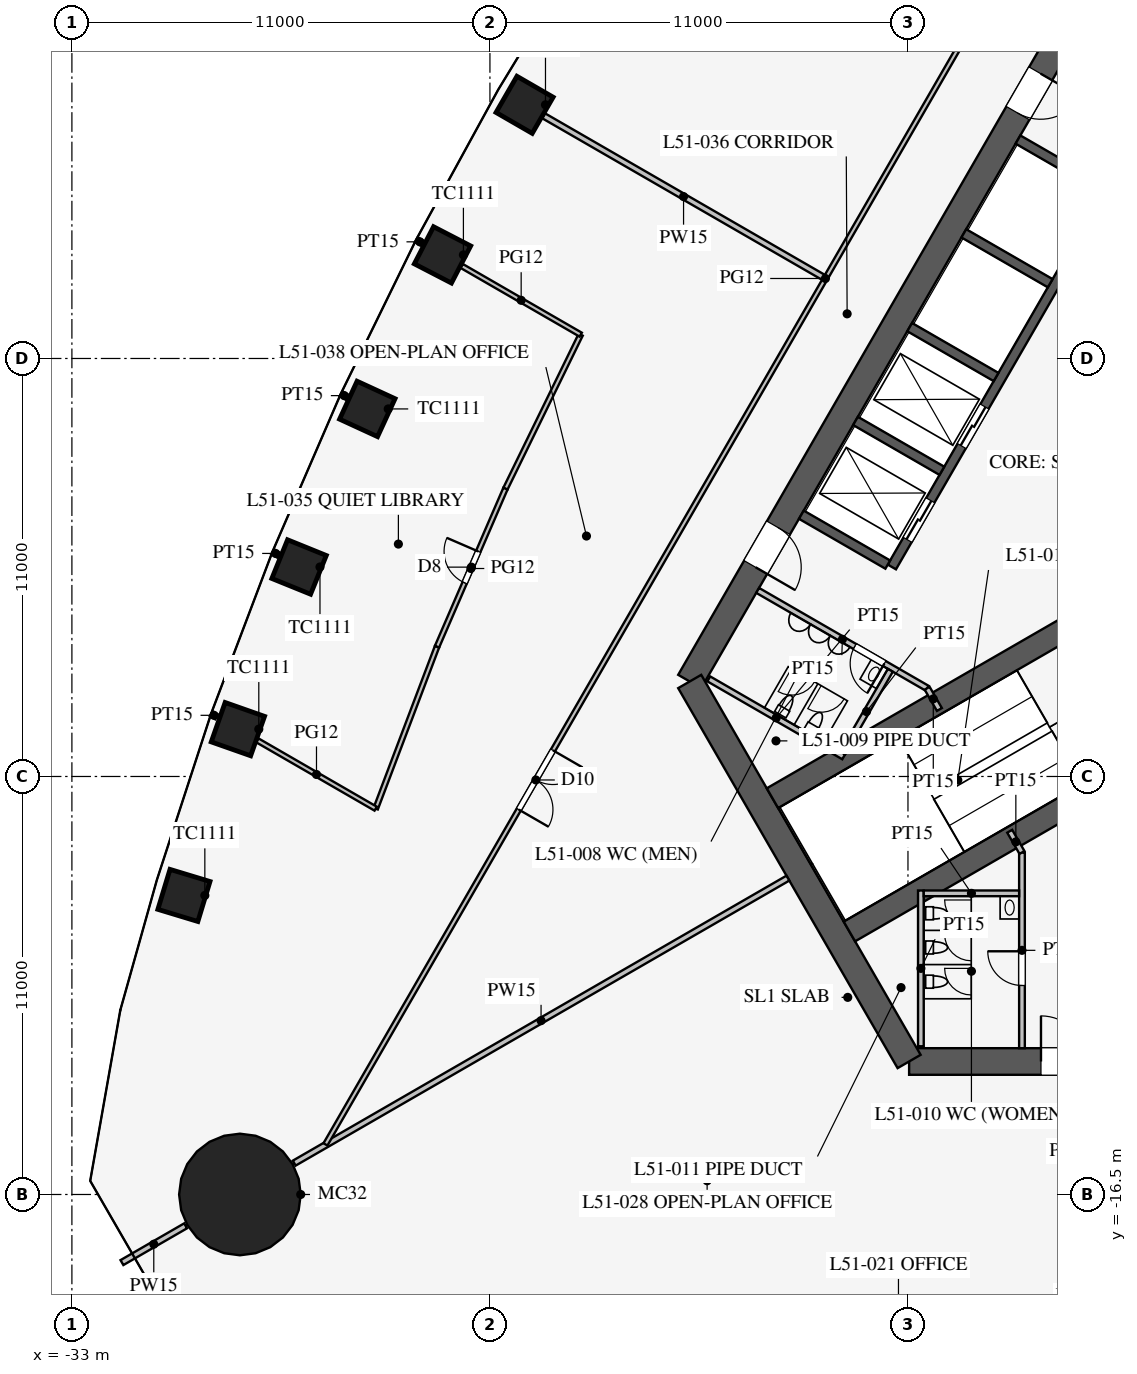
"""IFC4 building model, lengths in metres.
Left out: names, types, materials, properties, quantities, classifications, styles, units other than length and angle.
Written with IfcOpenShell. Run it as: python <this file> out.ifc"""

import sys

from ifc_helpers import new_model, si_unit, direction, frame, frame_2d, origin, origin_2d, place, context, subcontext, project, spatial, rectangle, circle, extrude, element, fill, save


model = new_model("IFC4")
c1 = context("Model", 3, precision=1e-05, world=origin(), true_north=direction((0.0, 1.0)))
c2 = subcontext(c1, "Body", "Model", "MODEL_VIEW")
j1 = project(units=[si_unit("LENGTHUNIT", "METRE"), si_unit("PLANEANGLEUNIT", "RADIAN")], contexts=[c1])
p1 = place(None, origin())
s1 = spatial("IfcSite", under=j1, at=p1, CompositionType="ELEMENT")
p2 = place(p1, origin())
s2 = spatial("IfcBuilding", under=s1, at=p2, CompositionType="ELEMENT")
p3 = place(p2, frame((0.0, 0.0, 223.3)))
s3 = spatial("IfcBuildingStorey", under=s2, at=p3, CompositionType="ELEMENT", Elevation=223.3)
for number, where, z_axis, x_axis in (
    (1, (-21.088, 12.175, 0.0), (0.0, 0.0, 1.0), (-0.5, -0.866, 0.0)),
    (2, (-23.248, 8.226, 0.0), (0.0, 0.0, 1.0), (-0.46, -0.888, 0.0)),
    (3, (-25.227, 4.172, 0.0), (0.0, 0.0, 1.0), (-0.418, -0.908, 0.0)),
    (4, (-27.022, 0.013, 0.0), (0.0, 0.0, 1.0), (-0.376, -0.927, 0.0)),
    (5, (-28.632, -4.254, 0.0), (0.0, 0.0, 1.0), (-0.332, -0.943, 0.0)),
    (6, (-30.052, -8.63, 0.0), (0.0, 0.0, 1.0), (-0.29, -0.957, 0.0)),
):
    element("IfcColumn", number, at=place(p3, frame(where, z_axis=z_axis, x_axis=x_axis)), inside=s3, PredefinedType="COLUMN", context=c2, shape_type="SweptSolid", body=[
        extrude(rectangle(XDim=1.1, YDim=1.1, at=origin_2d()), origin(), (0.0, 0.0, 1.0), 4.2),
    ])
p4 = place(p3, frame((-28.579, -16.5, 0.0), z_axis=(0.0, 0.0, 1.0), x_axis=(1.0, 0.0, 0.0)))
e7 = element("IfcColumn", 7, at=p4, inside=s3, PredefinedType="COLUMN", context=c2, shape_type="SweptSolid", body=[
    extrude(circle(Radius=1.6, at=origin_2d()), origin(), (0.0, 0.0, 1.0), 4.2),
])
p5 = place(p3, frame((-10.97, -13.0, 0.0), z_axis=(0.0, 0.0, 1.0), x_axis=(1.0, 0.0, 0.0)))
e8 = element("IfcWall", 8, at=p5, inside=s3, PredefinedType="SHEAR", context=c2, shape_type="SweptSolid", body=[
    extrude(rectangle(XDim=21.939, YDim=0.7, at=frame_2d((10.97, 0.0))), origin(), (0.0, 0.0, 1.0), 4.2),
])
p6 = place(p5, frame((17.27, 0.0, 0.0)))
e9 = element("IfcOpeningElement", 9, at=p6, cuts=e8, PredefinedType="OPENING", context=c2, shape_type="SweptSolid", body=[
    extrude(rectangle(XDim=1.2, YDim=2.1, at=frame_2d((0.6, 1.05))), frame((0.0, 0.36, 0.0), z_axis=(0.0, -1.0, 0.0), x_axis=(1.0, 0.0, 0.0)), (0.0, 0.0, 1.0), 0.72),
])
p7 = place(p5, frame((3.47, 0.0, 0.0)))
e10 = element("IfcOpeningElement", 10, at=p7, cuts=e8, PredefinedType="OPENING", context=c2, shape_type="SweptSolid", body=[
    extrude(rectangle(XDim=1.2, YDim=2.1, at=frame_2d((0.6, 1.05))), frame((0.0, 0.36, 0.0), z_axis=(0.0, -1.0, 0.0), x_axis=(1.0, 0.0, 0.0)), (0.0, 0.0, 1.0), 0.72),
])
p8 = place(p3, frame((-5.773, 16.0, 0.0), z_axis=(0.0, 0.0, 1.0), x_axis=(-0.500002442456, -0.866023993627, 0.0)))
e11 = element("IfcWall", 11, at=p8, inside=s3, PredefinedType="SHEAR", context=c2, shape_type="SweptSolid", body=[
    extrude(rectangle(XDim=21.939, YDim=0.7, at=frame_2d((10.97, 0.0))), origin(), (0.0, 0.0, 1.0), 4.2),
])
p9 = place(p8, frame((17.27, 0.0, 0.0)))
e12 = element("IfcOpeningElement", 12, at=p9, cuts=e11, PredefinedType="OPENING", context=c2, shape_type="SweptSolid", body=[
    extrude(rectangle(XDim=1.2, YDim=2.1, at=frame_2d((0.6, 1.05))), frame((0.0, 0.36, 0.0), z_axis=(0.0, -1.0, 0.0), x_axis=(1.0, 0.0, 0.0)), (0.0, 0.0, 1.0), 0.72),
])
p10 = place(p8, frame((3.47, 0.0, 0.0)))
e13 = element("IfcOpeningElement", 13, at=p10, cuts=e11, PredefinedType="OPENING", context=c2, shape_type="SweptSolid", body=[
    extrude(rectangle(XDim=1.2, YDim=2.1, at=frame_2d((0.6, 1.05))), frame((0.0, 0.36, 0.0), z_axis=(0.0, -1.0, 0.0), x_axis=(1.0, 0.0, 0.0)), (0.0, 0.0, 1.0), 0.72),
])
p11 = place(p3, frame((-16.743, -3.0, 0.0), z_axis=(0.0, 0.0, 1.0), x_axis=(0.499995765644, -0.866027848477, 0.0)))
e14 = element("IfcWall", 14, at=p11, inside=s3, PredefinedType="SHEAR", context=c2, shape_type="SweptSolid", body=[
    extrude(rectangle(XDim=11.547, YDim=0.7, at=frame_2d((5.773, 0.0))), origin(), (0.0, 0.0, 1.0), 4.2),
])
p12 = place(p3, frame((-5.724, 9.886, 0.0), z_axis=(0.0, 0.0, 1.0), x_axis=(-0.500001763848, -0.866024385424, 0.0)))
e15 = element("IfcWall", 15, at=p12, inside=s3, PredefinedType="SHEAR", context=c2, shape_type="SweptSolid", body=[
    extrude(rectangle(XDim=11.4, YDim=0.25, at=frame_2d((5.7, 0.0))), origin(), (0.0, 0.0, 1.0), 4.2),
])
p13 = place(p12, frame((6.525, 0.0, 0.0)))
e16 = element("IfcOpeningElement", 16, at=p13, cuts=e15, PredefinedType="OPENING", context=c2, shape_type="SweptSolid", body=[
    extrude(rectangle(XDim=1.2, YDim=2.2, at=frame_2d((0.6, 1.1))), frame((0.0, 0.135, 0.0), z_axis=(0.0, -1.0, 0.0), x_axis=(1.0, 0.0, 0.0)), (0.0, 0.0, 1.0), 0.27),
])
p14 = place(p12, frame((9.375, 0.0, 0.0)))
e17 = element("IfcOpeningElement", 17, at=p14, cuts=e15, PredefinedType="OPENING", context=c2, shape_type="SweptSolid", body=[
    extrude(rectangle(XDim=1.2, YDim=2.2, at=frame_2d((0.6, 1.1))), frame((0.0, 0.135, 0.0), z_axis=(0.0, -1.0, 0.0), x_axis=(1.0, 0.0, 0.0)), (0.0, 0.0, 1.0), 0.27),
])
for number, where, z_axis, x_axis in (
    (18, (-5.832, 9.949, 0.0), (0.0, 0.0, 1.0), (-0.866, 0.5, 0.0)),
    (19, (-7.257, 7.481, 0.0), (0.0, 0.0, 1.0), (-0.866, 0.5, 0.0)),
    (20, (-8.682, 5.012, 0.0), (0.0, 0.0, 1.0), (-0.866, 0.5, 0.0)),
    (21, (-10.107, 2.544, 0.0), (0.0, 0.0, 1.0), (-0.866, 0.5, 0.0)),
    (22, (-11.532, 0.076, 0.0), (0.0, 0.0, 1.0), (-0.866, 0.5, 0.0)),
):
    element("IfcWall", number, at=place(p3, frame(where, z_axis=z_axis, x_axis=x_axis)), inside=s3, PredefinedType="SHEAR", context=c2, shape_type="SweptSolid", body=[
        extrude(rectangle(XDim=2.625, YDim=0.25, at=frame_2d((1.312, 0.0))), origin(), (0.0, 0.0, 1.0), 4.2),
    ])
for number, where, z_axis, x_axis in (
    (23, (-6.663, -1.509, 0.0), (0.0, 0.0, 1.0), (-0.866, -0.5, 0.0)),
    (24, (-4.638, -5.016, 0.0), (0.0, 0.0, 1.0), (-0.866, -0.5, 0.0)),
):
    element("IfcWall", number, at=place(p3, frame(where, z_axis=z_axis, x_axis=x_axis)), inside=s3, PredefinedType="SHEAR", context=c2, shape_type="SweptSolid", body=[
        extrude(rectangle(XDim=9.125, YDim=0.6, at=frame_2d((4.562, 0.0))), origin(), (0.0, 0.0, 1.0), 4.2),
    ])
p15 = place(p3, frame((-8.0, -7.5, 0.0), z_axis=(0.0, 0.0, 1.0), x_axis=(0.0, -1.0, 0.0)))
e25 = element("IfcWall", 25, at=p15, inside=s3, PredefinedType="PARTITIONING", context=c2, shape_type="SweptSolid", body=[
    extrude(rectangle(XDim=5.15, YDim=0.15, at=frame_2d((2.575, 0.0))), origin(), (0.0, 0.0, 1.0), 4.0),
])
p16 = place(p15, frame((2.6, 0.0, 0.0)))
e26 = element("IfcOpeningElement", 26, at=p16, cuts=e25, PredefinedType="OPENING", context=c2, shape_type="SweptSolid", body=[
    extrude(rectangle(XDim=0.9, YDim=2.1, at=frame_2d((0.45, 1.05))), frame((0.0, 0.085, 0.0), z_axis=(0.0, -1.0, 0.0), x_axis=(1.0, 0.0, 0.0)), (0.0, 0.0, 1.0), 0.17),
])
p17 = place(p3, frame((-10.495, -3.178, 0.0), z_axis=(0.0, 0.0, 1.0), x_axis=(-0.866037967349, 0.499978238636, 0.0)))
e27 = element("IfcWall", 27, at=p17, inside=s3, PredefinedType="PARTITIONING", context=c2, shape_type="SweptSolid", body=[
    extrude(rectangle(XDim=5.15, YDim=0.15, at=frame_2d((2.575, 0.0))), origin(), (0.0, 0.0, 1.0), 4.0),
])
p18 = place(p17, frame((1.3, 0.0, 0.0)))
e28 = element("IfcOpeningElement", 28, at=p18, cuts=e27, PredefinedType="OPENING", context=c2, shape_type="SweptSolid", body=[
    extrude(rectangle(XDim=0.9, YDim=2.1, at=frame_2d((0.45, 1.05))), frame((0.0, 0.085, 0.0), z_axis=(0.0, -1.0, 0.0), x_axis=(1.0, 0.0, 0.0)), (0.0, 0.0, 1.0), 0.17),
])
for number, where, z_axis, x_axis in (
    (29, (-10.495, -3.178, 0.0), (0.0, 0.0, 1.0), (0.5, -0.866, 0.0)),
    (30, (-8.0, -7.5, 0.0), (0.0, 0.0, 1.0), (-0.5, 0.866, 0.0)),
):
    element("IfcWall", number, at=place(p3, frame(where, z_axis=z_axis, x_axis=x_axis)), inside=s3, PredefinedType="PARTITIONING", context=c2, shape_type="SweptSolid", body=[
        extrude(rectangle(XDim=0.645, YDim=0.15, at=frame_2d((0.323, 0.0))), origin(), (0.0, 0.0, 1.0), 4.0),
    ])
p19 = place(p3, frame((-12.691, -4.982, 0.0), z_axis=(0.0, 0.0, 1.0), x_axis=(-0.8660249478, 0.500000789788, 0.0)))
e31 = element("IfcWall", 31, at=p19, inside=s3, PredefinedType="PARTITIONING", context=c2, shape_type="SweptSolid", body=[
    extrude(rectangle(XDim=4.1, YDim=0.15, at=frame_2d((2.05, 0.0))), origin(), (0.0, 0.0, 1.0), 4.0),
])
p20 = place(p3, frame((-11.464, -2.706, 0.0), z_axis=(0.0, 0.0, 1.0), x_axis=(-0.50001992892, -0.866013897511, 0.0)))
e32 = element("IfcWall", 32, at=p20, inside=s3, PredefinedType="PARTITIONING", context=c2, shape_type="SweptSolid", body=[
    extrude(rectangle(XDim=2.51, YDim=0.15, at=frame_2d((1.255, 0.0))), origin(), (0.0, 0.0, 1.0), 4.0),
])
p21 = place(p3, frame((-10.66, -8.5, 0.0), z_axis=(0.0, 0.0, 1.0), x_axis=(0.0, -1.0, 0.0)))
e33 = element("IfcWall", 33, at=p21, inside=s3, PredefinedType="PARTITIONING", context=c2, shape_type="SweptSolid", body=[
    extrude(rectangle(XDim=4.1, YDim=0.15, at=frame_2d((2.05, 0.0))), origin(), (0.0, 0.0, 1.0), 4.0),
])
p22 = place(p3, frame((-8.075, -8.575, 0.0), z_axis=(0.0, 0.0, 1.0), x_axis=(-1.0, 0.0, 0.0)))
e34 = element("IfcWall", 34, at=p22, inside=s3, PredefinedType="PARTITIONING", context=c2, shape_type="SweptSolid", body=[
    extrude(rectangle(XDim=2.51, YDim=0.15, at=frame_2d((1.255, 0.0))), origin(), (0.0, 0.0, 1.0), 4.0),
])
p23 = place(p3, frame((-14.159, -8.175, 0.0), z_axis=(0.0, 0.0, 1.0), x_axis=(-0.866027028085, -0.499997186618, 0.0)))
e35 = element("IfcWall", 35, at=p23, inside=s3, PredefinedType="PARTITIONING", context=c2, shape_type="SweptSolid", body=[
    extrude(rectangle(XDim=15.0, YDim=0.15, at=frame_2d((7.5, 0.0))), origin(), (0.0, 0.0, 1.0), 2.4),
])
p24 = place(p3, frame((-30.008, -17.325, 0.0), z_axis=(0.0, 0.0, 1.0), x_axis=(-0.866013246922, -0.500021055713, 0.0)))
e36 = element("IfcWall", 36, at=p24, inside=s3, PredefinedType="PARTITIONING", context=c2, shape_type="SweptSolid", body=[
    extrude(rectangle(XDim=1.935, YDim=0.15, at=frame_2d((0.967, 0.0))), origin(), (0.0, 0.0, 1.0), 2.4),
])
p25 = place(p3, frame((-13.224, 7.635, 0.0), z_axis=(0.0, 0.0, 1.0), x_axis=(-0.86603062717, 0.499990952723, 0.0)))
e37 = element("IfcWall", 37, at=p25, inside=s3, PredefinedType="PARTITIONING", context=c2, shape_type="SweptSolid", body=[
    extrude(rectangle(XDim=8.501, YDim=0.15, at=frame_2d((4.25, 0.0))), origin(), (0.0, 0.0, 1.0), 3.3),
])
p26 = place(p3, frame((-0.016, 30.392, 0.0), z_axis=(0.0, 0.0, 1.0), x_axis=(-0.500000626146, -0.866025042278, 0.0)))
e38 = element("IfcWall", 38, at=p26, inside=s3, PredefinedType="PARTITIONING", context=c2, shape_type="SweptSolid", body=[
    extrude(rectangle(XDim=52.624, YDim=0.12, at=frame_2d((26.312, 0.0))), origin(), (0.0, 0.0, 1.0), 2.9),
])
p27 = place(p26, frame((10.15, 0.0, 0.15)))
e39 = element("IfcOpeningElement", 39, at=p27, cuts=e38, PredefinedType="OPENING", context=c2, shape_type="SweptSolid", body=[
    extrude(rectangle(XDim=1.8, YDim=2.1, at=frame_2d((0.9, 1.05))), frame((0.0, 0.07, 0.0), z_axis=(0.0, -1.0, 0.0), x_axis=(1.0, 0.0, 0.0)), (0.0, 0.0, 1.0), 0.14),
])
p28 = place(p26, frame((40.65, 0.0, 0.15)))
e40 = element("IfcOpeningElement", 40, at=p28, cuts=e38, PredefinedType="OPENING", context=c2, shape_type="SweptSolid", body=[
    extrude(rectangle(XDim=1.8, YDim=2.1, at=frame_2d((0.9, 1.05))), frame((0.0, 0.07, 0.0), z_axis=(0.0, -1.0, 0.0), x_axis=(1.0, 0.0, 0.0)), (0.0, 0.0, 1.0), 0.14),
])
p29 = place(p3, frame((-27.563, 0.325, 0.0), z_axis=(0.0, 0.0, 1.0), x_axis=(-0.865614066289, 0.500711781609, 0.0)))
e41 = element("IfcWall", 41, at=p29, inside=s3, PredefinedType="PARTITIONING", context=c2, shape_type="SweptSolid", body=[
    extrude(rectangle(XDim=0.178, YDim=0.15, at=frame_2d((0.089, 0.0))), origin(), (0.0, 0.0, 1.0), 2.9),
])
p30 = place(p3, frame((-29.191, -3.931, 0.0), z_axis=(0.0, 0.0, 1.0), x_axis=(-0.866484919499, 0.499203249469, 0.0)))
e42 = element("IfcWall", 42, at=p30, inside=s3, PredefinedType="PARTITIONING", context=c2, shape_type="SweptSolid", body=[
    extrude(rectangle(XDim=0.163, YDim=0.15, at=frame_2d((0.082, 0.0))), origin(), (0.0, 0.0, 1.0), 2.9),
])
p31 = place(p3, frame((-23.749, 8.515, 0.0), z_axis=(0.0, 0.0, 1.0), x_axis=(-0.865810949009, 0.500371262739, 0.0)))
e43 = element("IfcWall", 43, at=p31, inside=s3, PredefinedType="PARTITIONING", context=c2, shape_type="SweptSolid", body=[
    extrude(rectangle(XDim=0.217, YDim=0.15, at=frame_2d((0.108, 0.0))), origin(), (0.0, 0.0, 1.0), 2.9),
])
p32 = place(p3, frame((-25.748, 4.473, 0.0), z_axis=(0.0, 0.0, 1.0), x_axis=(-0.865625187776, 0.500692554656, 0.0)))
e44 = element("IfcWall", 44, at=p32, inside=s3, PredefinedType="PARTITIONING", context=c2, shape_type="SweptSolid", body=[
    extrude(rectangle(XDim=0.196, YDim=0.15, at=frame_2d((0.098, 0.0))), origin(), (0.0, 0.0, 1.0), 2.9),
])
p33 = place(p3, frame((-23.392, -2.083, 0.0), z_axis=(0.0, 0.0, 1.0), x_axis=(-0.354219967303, -0.935162132875, 0.0)))
e45 = element("IfcWall", 45, at=p33, inside=s3, PredefinedType="PARTITIONING", context=c2, shape_type="SweptSolid", body=[
    extrude(rectangle(XDim=4.559, YDim=0.12, at=frame_2d((2.28, 0.0))), origin(), (0.0, 0.0, 1.0), 2.9),
])
p34 = place(p3, frame((-19.611, 6.126, 0.0), z_axis=(0.0, 0.0, 1.0), x_axis=(-0.439163535873, -0.898407139753, 0.0)))
e46 = element("IfcWall", 46, at=p34, inside=s3, PredefinedType="PARTITIONING", context=c2, shape_type="SweptSolid", body=[
    extrude(rectangle(XDim=4.511, YDim=0.12, at=frame_2d((2.255, 0.0))), origin(), (0.0, 0.0, 1.0), 2.9),
])
p35 = place(p3, frame((-21.592, 2.074, 0.0), z_axis=(0.0, 0.0, 1.0), x_axis=(-0.397208101111, -0.917728567939, 0.0)))
e47 = element("IfcWall", 47, at=p35, inside=s3, PredefinedType="PARTITIONING", context=c2, shape_type="SweptSolid", body=[
    extrude(rectangle(XDim=4.53, YDim=0.12, at=frame_2d((2.265, 0.0))), origin(), (0.0, 0.0, 1.0), 2.9),
])
p36 = place(p35, frame((1.8, 0.0, 0.15)))
e48 = element("IfcOpeningElement", 48, at=p36, cuts=e47, PredefinedType="OPENING", context=c2, shape_type="SweptSolid", body=[
    extrude(rectangle(XDim=0.9, YDim=2.1, at=frame_2d((0.45, 1.05))), frame((0.0, 0.07, 0.0), z_axis=(0.0, -1.0, 0.0), x_axis=(1.0, 0.0, 0.0)), (0.0, 0.0, 1.0), 0.14),
])
p37 = place(p3, frame((-25.007, -6.347, 0.0), z_axis=(0.0, 0.0, 1.0), x_axis=(-0.866032969717, 0.499986895192, 0.0)))
e49 = element("IfcWall", 49, at=p37, inside=s3, PredefinedType="PARTITIONING", context=c2, shape_type="SweptSolid", body=[
    extrude(rectangle(XDim=3.596, YDim=0.12, at=frame_2d((1.798, 0.0))), origin(), (0.0, 0.0, 1.0), 2.9),
])
p38 = place(p3, frame((-19.611, 6.126, 0.0), z_axis=(0.0, 0.0, 1.0), x_axis=(-0.86602154905, 0.500006676536, 0.0)))
e50 = element("IfcWall", 50, at=p38, inside=s3, PredefinedType="PARTITIONING", context=c2, shape_type="SweptSolid", body=[
    extrude(rectangle(XDim=3.619, YDim=0.12, at=frame_2d((1.809, 0.0))), origin(), (0.0, 0.0, 1.0), 2.9),
])
p39 = place(p16, frame((0.9, 0.0, 0.0), z_axis=(0.0, 0.0, 1.0), x_axis=(-1.0, 0.0, 0.0)))
e51 = element("IfcDoor", 51, at=p39, inside=s3, OperationType="SINGLE_SWING_RIGHT", PredefinedType="DOOR", context=c2, shape_type="SweptSolid", body=[
    extrude(rectangle(XDim=0.9, YDim=2.1, at=frame_2d((0.45, 1.05))), frame((0.0, 0.025, 0.0), z_axis=(0.0, -1.0, 0.0), x_axis=(1.0, 0.0, 0.0)), (0.0, 0.0, 1.0), 0.05),
])
fill(e26, e51)
p40 = place(p18, origin())
e52 = element("IfcDoor", 52, at=p40, inside=s3, OperationType="SINGLE_SWING_LEFT", PredefinedType="DOOR", context=c2, shape_type="SweptSolid", body=[
    extrude(rectangle(XDim=0.9, YDim=2.1, at=frame_2d((0.45, 1.05))), frame((0.0, 0.025, 0.0), z_axis=(0.0, -1.0, 0.0), x_axis=(1.0, 0.0, 0.0)), (0.0, 0.0, 1.0), 0.05),
])
fill(e28, e52)
p41 = place(p7, origin())
e53 = element("IfcDoor", 53, at=p41, inside=s3, OperationType="SINGLE_SWING_LEFT", PredefinedType="DOOR", context=c2, shape_type="SweptSolid", body=[
    extrude(rectangle(XDim=1.2, YDim=2.1, at=frame_2d((0.6, 1.05))), frame((0.0, 0.025, 0.0), z_axis=(0.0, -1.0, 0.0), x_axis=(1.0, 0.0, 0.0)), (0.0, 0.0, 1.0), 0.05),
])
fill(e10, e53)
p42 = place(p9, origin())
e54 = element("IfcDoor", 54, at=p42, inside=s3, OperationType="SINGLE_SWING_RIGHT", PredefinedType="DOOR", context=c2, shape_type="SweptSolid", body=[
    extrude(rectangle(XDim=1.2, YDim=2.1, at=frame_2d((0.6, 1.05))), frame((0.0, 0.025, 0.0), z_axis=(0.0, -1.0, 0.0), x_axis=(1.0, 0.0, 0.0)), (0.0, 0.0, 1.0), 0.05),
])
fill(e12, e54)
p43 = place(p10, origin())
e55 = element("IfcDoor", 55, at=p43, inside=s3, OperationType="SINGLE_SWING_LEFT", PredefinedType="DOOR", context=c2, shape_type="SweptSolid", body=[
    extrude(rectangle(XDim=1.2, YDim=2.1, at=frame_2d((0.6, 1.05))), frame((0.0, 0.025, 0.0), z_axis=(0.0, -1.0, 0.0), x_axis=(1.0, 0.0, 0.0)), (0.0, 0.0, 1.0), 0.05),
])
fill(e13, e55)
p44 = place(p36, frame((0.9, 0.0, 0.0), z_axis=(0.0, 0.0, 1.0), x_axis=(-1.0, 0.0, 0.0)))
e56 = element("IfcDoor", 56, at=p44, inside=s3, OperationType="SINGLE_SWING_RIGHT", PredefinedType="DOOR", context=c2, shape_type="SweptSolid", body=[
    extrude(rectangle(XDim=0.9, YDim=2.1, at=frame_2d((0.45, 1.05))), frame((0.0, 0.025, 0.0), z_axis=(0.0, -1.0, 0.0), x_axis=(1.0, 0.0, 0.0)), (0.0, 0.0, 1.0), 0.05),
])
fill(e48, e56)
p45 = place(p28, origin())
e57 = element("IfcDoor", 57, at=p45, inside=s3, OperationType="DOUBLE_DOOR_SINGLE_SWING", PredefinedType="DOOR", context=c2, shape_type="SweptSolid", body=[
    extrude(rectangle(XDim=1.8, YDim=2.1, at=frame_2d((0.9, 1.05))), frame((0.0, 0.025, 0.0), z_axis=(0.0, -1.0, 0.0), x_axis=(1.0, 0.0, 0.0)), (0.0, 0.0, 1.0), 0.05),
])
fill(e40, e57)
p46 = place(p13, origin())
e58 = element("IfcDoor", 58, at=p46, inside=s3, OperationType="DOUBLE_DOOR_SLIDING", PredefinedType="DOOR", context=c2, shape_type="SweptSolid", body=[
    extrude(rectangle(XDim=1.2, YDim=2.2, at=frame_2d((0.6, 1.1))), frame((0.0, 0.025, 0.0), z_axis=(0.0, -1.0, 0.0), x_axis=(1.0, 0.0, 0.0)), (0.0, 0.0, 1.0), 0.05),
])
fill(e16, e58)
p47 = place(p14, origin())
e59 = element("IfcDoor", 59, at=p47, inside=s3, OperationType="DOUBLE_DOOR_SLIDING", PredefinedType="DOOR", context=c2, shape_type="SweptSolid", body=[
    extrude(rectangle(XDim=1.2, YDim=2.2, at=frame_2d((0.6, 1.1))), frame((0.0, 0.025, 0.0), z_axis=(0.0, -1.0, 0.0), x_axis=(1.0, 0.0, 0.0)), (0.0, 0.0, 1.0), 0.05),
])
fill(e17, e59)
save(model, sys.argv[1])
